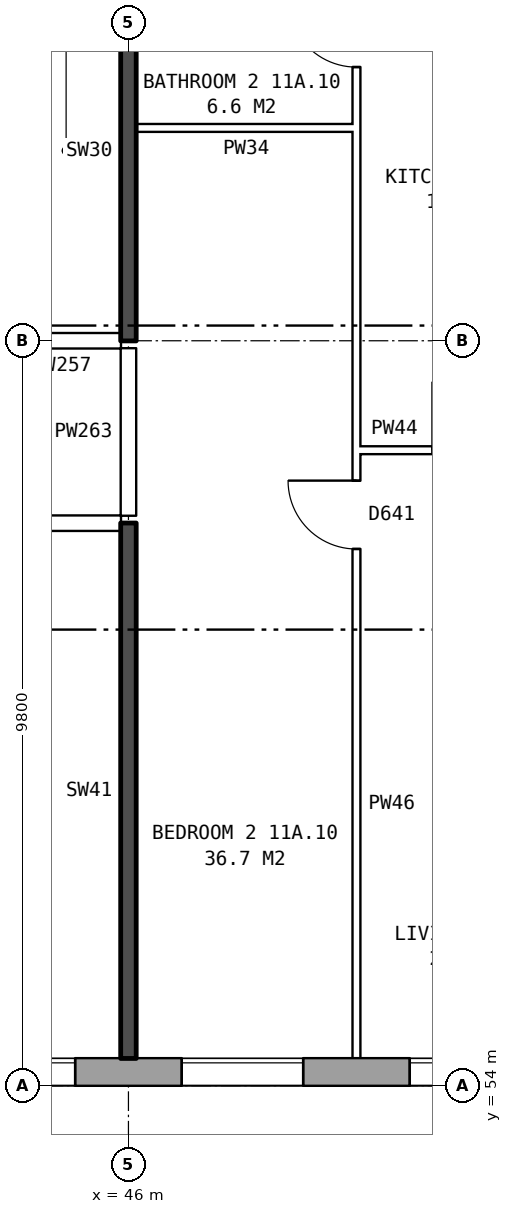
"""IFC4 building model, lengths in metres.
Left out: names, types, materials, properties, quantities, classifications, styles, units other than length and angle.
Written with IfcOpenShell. Run it as: python <this file> out.ifc"""

import sys

from ifc_helpers import new_model, si_unit, direction, frame, frame_2d, origin, place, context, subcontext, project, spatial, rectangle, extrude, element, fill, save


model = new_model("IFC4")
c1 = context("Model", 3, precision=1e-05, world=origin(), true_north=direction((0.0, 1.0)))
c2 = subcontext(c1, "Body", "Model", "MODEL_VIEW")
j1 = project(units=[si_unit("LENGTHUNIT", "METRE"), si_unit("PLANEANGLEUNIT", "RADIAN")], contexts=[c1])
p1 = place(None, origin())
s1 = spatial("IfcSite", under=j1, at=p1, CompositionType="ELEMENT")
p2 = place(p1, origin())
s2 = spatial("IfcBuilding", under=s1, at=p2, CompositionType="ELEMENT")
p3 = place(p2, frame((0.0, 0.0, 44.3)))
s3 = spatial("IfcBuildingStorey", under=s2, at=p3, CompositionType="ELEMENT", Elevation=44.3)
p4 = place(p3, frame((24.575, 54.18, 0.0), z_axis=(0.0, 0.0, 1.0), x_axis=(1.0, 0.0, 0.0)))
e1 = element("IfcWall", 1, at=p4, inside=s3, PredefinedType="STANDARD", context=c2, shape_type="SweptSolid", body=[
    extrude(rectangle(XDim=48.351, YDim=0.36, at=frame_2d((24.175, 0.0))), origin(), (0.0, 0.0, 1.0), 2.85),
])
p5 = place(p4, frame((0.65, 0.0, 0.8)))
e2 = element("IfcOpeningElement", 2, at=p5, cuts=e1, PredefinedType="OPENING", context=c2, shape_type="SweptSolid", body=[
    extrude(rectangle(XDim=1.0, YDim=0.9, at=frame_2d((0.5, 0.45))), frame((0.0, 0.19, 0.0), z_axis=(0.0, -1.0, 0.0), x_axis=(1.0, 0.0, 0.0)), (0.0, 0.0, 1.0), 0.38),
])
p6 = place(p4, frame((4.125, 0.0, 0.8)))
e3 = element("IfcOpeningElement", 3, at=p6, cuts=e1, PredefinedType="OPENING", context=c2, shape_type="SweptSolid", body=[
    extrude(rectangle(XDim=1.6, YDim=1.8, at=frame_2d((0.8, 0.9))), frame((0.0, 0.19, 0.0), z_axis=(0.0, -1.0, 0.0), x_axis=(1.0, 0.0, 0.0)), (0.0, 0.0, 1.0), 0.38),
])
p7 = place(p4, frame((7.125, 0.0, 0.8)))
e4 = element("IfcOpeningElement", 4, at=p7, cuts=e1, PredefinedType="OPENING", context=c2, shape_type="SweptSolid", body=[
    extrude(rectangle(XDim=1.6, YDim=1.8, at=frame_2d((0.8, 0.9))), frame((0.0, 0.19, 0.0), z_axis=(0.0, -1.0, 0.0), x_axis=(1.0, 0.0, 0.0)), (0.0, 0.0, 1.0), 0.38),
])
p8 = place(p4, frame((10.125, 0.0, 0.8)))
e5 = element("IfcOpeningElement", 5, at=p8, cuts=e1, PredefinedType="OPENING", context=c2, shape_type="SweptSolid", body=[
    extrude(rectangle(XDim=1.6, YDim=1.8, at=frame_2d((0.8, 0.9))), frame((0.0, 0.19, 0.0), z_axis=(0.0, -1.0, 0.0), x_axis=(1.0, 0.0, 0.0)), (0.0, 0.0, 1.0), 0.38),
])
p9 = place(p4, frame((13.125, 0.0, 0.8)))
e6 = element("IfcOpeningElement", 6, at=p9, cuts=e1, PredefinedType="OPENING", context=c2, shape_type="SweptSolid", body=[
    extrude(rectangle(XDim=1.6, YDim=1.8, at=frame_2d((0.8, 0.9))), frame((0.0, 0.19, 0.0), z_axis=(0.0, -1.0, 0.0), x_axis=(1.0, 0.0, 0.0)), (0.0, 0.0, 1.0), 0.38),
])
p10 = place(p4, frame((16.125, 0.0, 0.8)))
e7 = element("IfcOpeningElement", 7, at=p10, cuts=e1, PredefinedType="OPENING", context=c2, shape_type="SweptSolid", body=[
    extrude(rectangle(XDim=1.6, YDim=1.8, at=frame_2d((0.8, 0.9))), frame((0.0, 0.19, 0.0), z_axis=(0.0, -1.0, 0.0), x_axis=(1.0, 0.0, 0.0)), (0.0, 0.0, 1.0), 0.38),
])
p11 = place(p4, frame((19.125, 0.0, 0.8)))
e8 = element("IfcOpeningElement", 8, at=p11, cuts=e1, PredefinedType="OPENING", context=c2, shape_type="SweptSolid", body=[
    extrude(rectangle(XDim=1.6, YDim=1.8, at=frame_2d((0.8, 0.9))), frame((0.0, 0.19, 0.0), z_axis=(0.0, -1.0, 0.0), x_axis=(1.0, 0.0, 0.0)), (0.0, 0.0, 1.0), 0.38),
])
p12 = place(p4, frame((22.125, 0.0, 0.8)))
e9 = element("IfcOpeningElement", 9, at=p12, cuts=e1, PredefinedType="OPENING", context=c2, shape_type="SweptSolid", body=[
    extrude(rectangle(XDim=1.6, YDim=1.8, at=frame_2d((0.8, 0.9))), frame((0.0, 0.19, 0.0), z_axis=(0.0, -1.0, 0.0), x_axis=(1.0, 0.0, 0.0)), (0.0, 0.0, 1.0), 0.38),
])
p13 = place(p4, frame((25.125, 0.0, 0.8)))
e10 = element("IfcOpeningElement", 10, at=p13, cuts=e1, PredefinedType="OPENING", context=c2, shape_type="SweptSolid", body=[
    extrude(rectangle(XDim=1.6, YDim=1.8, at=frame_2d((0.8, 0.9))), frame((0.0, 0.19, 0.0), z_axis=(0.0, -1.0, 0.0), x_axis=(1.0, 0.0, 0.0)), (0.0, 0.0, 1.0), 0.38),
])
p14 = place(p4, frame((28.125, 0.0, 0.8)))
e11 = element("IfcOpeningElement", 11, at=p14, cuts=e1, PredefinedType="OPENING", context=c2, shape_type="SweptSolid", body=[
    extrude(rectangle(XDim=1.6, YDim=1.8, at=frame_2d((0.8, 0.9))), frame((0.0, 0.19, 0.0), z_axis=(0.0, -1.0, 0.0), x_axis=(1.0, 0.0, 0.0)), (0.0, 0.0, 1.0), 0.38),
])
p15 = place(p4, frame((31.125, 0.0, 0.8)))
e12 = element("IfcOpeningElement", 12, at=p15, cuts=e1, PredefinedType="OPENING", context=c2, shape_type="SweptSolid", body=[
    extrude(rectangle(XDim=1.6, YDim=1.8, at=frame_2d((0.8, 0.9))), frame((0.0, 0.19, 0.0), z_axis=(0.0, -1.0, 0.0), x_axis=(1.0, 0.0, 0.0)), (0.0, 0.0, 1.0), 0.38),
])
p16 = place(p4, frame((34.125, 0.0, 0.8)))
e13 = element("IfcOpeningElement", 13, at=p16, cuts=e1, PredefinedType="OPENING", context=c2, shape_type="SweptSolid", body=[
    extrude(rectangle(XDim=1.6, YDim=1.8, at=frame_2d((0.8, 0.9))), frame((0.0, 0.19, 0.0), z_axis=(0.0, -1.0, 0.0), x_axis=(1.0, 0.0, 0.0)), (0.0, 0.0, 1.0), 0.38),
])
p17 = place(p4, frame((37.125, 0.0, 0.8)))
e14 = element("IfcOpeningElement", 14, at=p17, cuts=e1, PredefinedType="OPENING", context=c2, shape_type="SweptSolid", body=[
    extrude(rectangle(XDim=1.6, YDim=1.8, at=frame_2d((0.8, 0.9))), frame((0.0, 0.19, 0.0), z_axis=(0.0, -1.0, 0.0), x_axis=(1.0, 0.0, 0.0)), (0.0, 0.0, 1.0), 0.38),
])
p18 = place(p4, frame((40.125, 0.0, 0.8)))
e15 = element("IfcOpeningElement", 15, at=p18, cuts=e1, PredefinedType="OPENING", context=c2, shape_type="SweptSolid", body=[
    extrude(rectangle(XDim=1.6, YDim=1.8, at=frame_2d((0.8, 0.9))), frame((0.0, 0.19, 0.0), z_axis=(0.0, -1.0, 0.0), x_axis=(1.0, 0.0, 0.0)), (0.0, 0.0, 1.0), 0.38),
])
p19 = place(p4, frame((43.125, 0.0, 0.8)))
e16 = element("IfcOpeningElement", 16, at=p19, cuts=e1, PredefinedType="OPENING", context=c2, shape_type="SweptSolid", body=[
    extrude(rectangle(XDim=1.6, YDim=1.8, at=frame_2d((0.8, 0.9))), frame((0.0, 0.19, 0.0), z_axis=(0.0, -1.0, 0.0), x_axis=(1.0, 0.0, 0.0)), (0.0, 0.0, 1.0), 0.38),
])
p20 = place(p4, frame((45.625, 0.0, 0.8)))
e17 = element("IfcOpeningElement", 17, at=p20, cuts=e1, PredefinedType="OPENING", context=c2, shape_type="SweptSolid", body=[
    extrude(rectangle(XDim=1.0, YDim=1.5, at=frame_2d((0.5, 0.75))), frame((0.0, 0.19, 0.0), z_axis=(0.0, -1.0, 0.0), x_axis=(1.0, 0.0, 0.0)), (0.0, 0.0, 1.0), 0.38),
])
p21 = place(p4, frame((2.0, 0.0, 0.8)))
e18 = element("IfcOpeningElement", 18, at=p21, cuts=e1, PredefinedType="OPENING", context=c2, shape_type="SweptSolid", body=[
    extrude(rectangle(XDim=1.2, YDim=1.8, at=frame_2d((0.6, 0.9))), frame((0.0, 0.19, 0.0), z_axis=(0.0, -1.0, 0.0), x_axis=(1.0, 0.0, 0.0)), (0.0, 0.0, 1.0), 0.38),
])
p22 = place(p4, frame((46.925, 0.0, 0.8)))
e19 = element("IfcOpeningElement", 19, at=p22, cuts=e1, PredefinedType="OPENING", context=c2, shape_type="SweptSolid", body=[
    extrude(rectangle(XDim=0.6, YDim=0.9, at=frame_2d((0.3, 0.45))), frame((0.0, 0.19, 0.0), z_axis=(0.0, -1.0, 0.0), x_axis=(1.0, 0.0, 0.0)), (0.0, 0.0, 1.0), 0.38),
])
p23 = place(p3, frame((21.86, 61.4, 0.0), z_axis=(0.0, 0.0, 1.0), x_axis=(1.0, 0.0, 0.0)))
e20 = element("IfcWall", 20, at=p23, inside=s3, PredefinedType="PARTITIONING", context=c2, shape_type="SweptSolid", body=[
    extrude(rectangle(XDim=24.04, YDim=0.2, at=frame_2d((12.02, 0.0))), origin(), (0.0, 0.0, 1.0), 2.85),
])
p24 = place(p23, frame((20.59, 0.0, 0.0)))
e21 = element("IfcOpeningElement", 21, at=p24, cuts=e20, PredefinedType="OPENING", context=c2, shape_type="SweptSolid", body=[
    extrude(rectangle(XDim=1.0, YDim=2.1, at=frame_2d((0.5, 1.05))), frame((0.0, 0.11, 0.0), z_axis=(0.0, -1.0, 0.0), x_axis=(1.0, 0.0, 0.0)), (0.0, 0.0, 1.0), 0.22),
])
p25 = place(p23, frame((8.64, 0.0, 0.0)))
e22 = element("IfcOpeningElement", 22, at=p25, cuts=e20, PredefinedType="OPENING", context=c2, shape_type="SweptSolid", body=[
    extrude(rectangle(XDim=1.0, YDim=2.1, at=frame_2d((0.5, 1.05))), frame((0.0, 0.11, 0.0), z_axis=(0.0, -1.0, 0.0), x_axis=(1.0, 0.0, 0.0)), (0.0, 0.0, 1.0), 0.22),
])
p26 = place(p23, frame((3.64, 0.0, 0.0)))
e23 = element("IfcOpeningElement", 23, at=p26, cuts=e20, PredefinedType="OPENING", context=c2, shape_type="SweptSolid", body=[
    extrude(rectangle(XDim=1.0, YDim=2.1, at=frame_2d((0.5, 1.05))), frame((0.0, 0.11, 0.0), z_axis=(0.0, -1.0, 0.0), x_axis=(1.0, 0.0, 0.0)), (0.0, 0.0, 1.0), 0.22),
])
p27 = place(p3, frame((49.0, 62.36, 0.0), z_axis=(0.0, 0.0, 1.0), x_axis=(1.0, 0.0, 0.0)))
e24 = element("IfcWall", 24, at=p27, inside=s3, PredefinedType="PARTITIONING", context=c2, shape_type="SweptSolid", body=[
    extrude(rectangle(XDim=2.9, YDim=0.1, at=frame_2d((1.45, 0.0))), origin(), (0.0, 0.0, 1.0), 2.85),
])
p28 = place(p27, frame((1.0, 0.0, 0.0)))
e25 = element("IfcOpeningElement", 25, at=p28, cuts=e24, PredefinedType="OPENING", context=c2, shape_type="SweptSolid", body=[
    extrude(rectangle(XDim=0.9, YDim=2.1, at=frame_2d((0.45, 1.05))), frame((0.0, 0.06, 0.0), z_axis=(0.0, -1.0, 0.0), x_axis=(1.0, 0.0, 0.0)), (0.0, 0.0, 1.0), 0.12),
])
p29 = place(p3, frame((44.36, 63.8, 0.0), z_axis=(0.0, 0.0, 1.0), x_axis=(1.0, 0.0, 0.0)))
e26 = element("IfcWall", 26, at=p29, inside=s3, PredefinedType="PARTITIONING", context=c2, shape_type="SweptSolid", body=[
    extrude(rectangle(XDim=1.54, YDim=0.2, at=frame_2d((0.77, 0.0))), origin(), (0.0, 0.0, 1.0), 2.85),
])
p30 = place(p3, frame((46.1, 66.6, 0.0), z_axis=(0.0, 0.0, 1.0), x_axis=(1.0, 0.0, 0.0)))
e27 = element("IfcWall", 27, at=p30, inside=s3, PredefinedType="PARTITIONING", context=c2, shape_type="SweptSolid", body=[
    extrude(rectangle(XDim=2.9, YDim=0.1, at=frame_2d((1.45, 0.0))), origin(), (0.0, 0.0, 1.0), 2.85),
])
p31 = place(p3, frame((46.0, 54.36, 0.0), z_axis=(0.0, 0.0, 1.0), x_axis=(0.0, 1.0, 0.0)))
e28 = element("IfcWall", 28, at=p31, inside=s3, PredefinedType="SOLIDWALL", context=c2, shape_type="SweptSolid", body=[
    extrude(rectangle(XDim=7.04, YDim=0.2, at=frame_2d((3.52, 0.0))), origin(), (0.0, 0.0, 1.0), 2.85),
])
p32 = place(p3, frame((46.0, 61.5, 0.0), z_axis=(0.0, 0.0, 1.0), x_axis=(0.0, 1.0, 0.0)))
e29 = element("IfcWall", 29, at=p32, inside=s3, PredefinedType="PARTITIONING", context=c2, shape_type="SweptSolid", body=[
    extrude(rectangle(XDim=2.2, YDim=0.2, at=frame_2d((1.1, 0.0))), origin(), (0.0, 0.0, 1.0), 2.85),
])
p33 = place(p3, frame((46.0, 63.8, 0.0), z_axis=(0.0, 0.0, 1.0), x_axis=(0.0, 1.0, 0.0)))
e30 = element("IfcWall", 30, at=p33, inside=s3, PredefinedType="SOLIDWALL", context=c2, shape_type="SweptSolid", body=[
    extrude(rectangle(XDim=5.0, YDim=0.2, at=frame_2d((2.5, 0.0))), origin(), (0.0, 0.0, 1.0), 2.85),
])
p34 = place(p3, frame((49.0, 54.36, 0.0), z_axis=(0.0, 0.0, 1.0), x_axis=(0.0, 1.0, 0.0)))
e31 = element("IfcWall", 31, at=p34, inside=s3, PredefinedType="PARTITIONING", context=c2, shape_type="SweptSolid", body=[
    extrude(rectangle(XDim=14.34, YDim=0.1, at=frame_2d((7.17, 0.0))), origin(), (0.0, 0.0, 1.0), 2.85),
])
p35 = place(p34, frame((6.7, 0.0, 0.0)))
e32 = element("IfcOpeningElement", 32, at=p35, cuts=e31, PredefinedType="OPENING", context=c2, shape_type="SweptSolid", body=[
    extrude(rectangle(XDim=0.9, YDim=2.1, at=frame_2d((0.45, 1.05))), frame((0.0, 0.06, 0.0), z_axis=(0.0, -1.0, 0.0), x_axis=(1.0, 0.0, 0.0)), (0.0, 0.0, 1.0), 0.12),
])
p36 = place(p34, frame((13.04, 0.0, 0.0)))
e33 = element("IfcOpeningElement", 33, at=p36, cuts=e31, PredefinedType="OPENING", context=c2, shape_type="SweptSolid", body=[
    extrude(rectangle(XDim=0.9, YDim=2.1, at=frame_2d((0.45, 1.05))), frame((0.0, 0.06, 0.0), z_axis=(0.0, -1.0, 0.0), x_axis=(1.0, 0.0, 0.0)), (0.0, 0.0, 1.0), 0.12),
])
p37 = place(p11, origin())
e34 = element("IfcWindow", 34, at=p37, inside=s3, PartitioningType="SINGLE_PANEL", PredefinedType="WINDOW", context=c2, shape_type="SweptSolid", body=[
    extrude(rectangle(XDim=1.6, YDim=1.8, at=frame_2d((0.8, 0.9))), frame((0.0, 0.15, 0.0), z_axis=(0.0, -1.0, 0.0), x_axis=(1.0, 0.0, 0.0)), (0.0, 0.0, 1.0), 0.06),
])
fill(e8, e34)
p38 = place(p12, origin())
e35 = element("IfcWindow", 35, at=p38, inside=s3, PartitioningType="SINGLE_PANEL", PredefinedType="WINDOW", context=c2, shape_type="SweptSolid", body=[
    extrude(rectangle(XDim=1.6, YDim=1.8, at=frame_2d((0.8, 0.9))), frame((0.0, 0.15, 0.0), z_axis=(0.0, -1.0, 0.0), x_axis=(1.0, 0.0, 0.0)), (0.0, 0.0, 1.0), 0.06),
])
fill(e9, e35)
p39 = place(p13, origin())
e36 = element("IfcWindow", 36, at=p39, inside=s3, PartitioningType="SINGLE_PANEL", PredefinedType="WINDOW", context=c2, shape_type="SweptSolid", body=[
    extrude(rectangle(XDim=1.6, YDim=1.8, at=frame_2d((0.8, 0.9))), frame((0.0, 0.15, 0.0), z_axis=(0.0, -1.0, 0.0), x_axis=(1.0, 0.0, 0.0)), (0.0, 0.0, 1.0), 0.06),
])
fill(e10, e36)
p40 = place(p35, origin())
e37 = element("IfcDoor", 37, at=p40, inside=s3, OperationType="SINGLE_SWING_RIGHT", PredefinedType="DOOR", context=c2, shape_type="SweptSolid", body=[
    extrude(rectangle(XDim=0.9, YDim=2.1, at=frame_2d((0.45, 1.05))), frame((0.0, 0.025, 0.0), z_axis=(0.0, -1.0, 0.0), x_axis=(1.0, 0.0, 0.0)), (0.0, 0.0, 1.0), 0.05),
])
fill(e32, e37)
p41 = place(p36, origin())
e38 = element("IfcDoor", 38, at=p41, inside=s3, OperationType="SINGLE_SWING_RIGHT", PredefinedType="DOOR", context=c2, shape_type="SweptSolid", body=[
    extrude(rectangle(XDim=0.9, YDim=2.1, at=frame_2d((0.45, 1.05))), frame((0.0, 0.025, 0.0), z_axis=(0.0, -1.0, 0.0), x_axis=(1.0, 0.0, 0.0)), (0.0, 0.0, 1.0), 0.05),
])
fill(e33, e38)
save(model, sys.argv[1])
